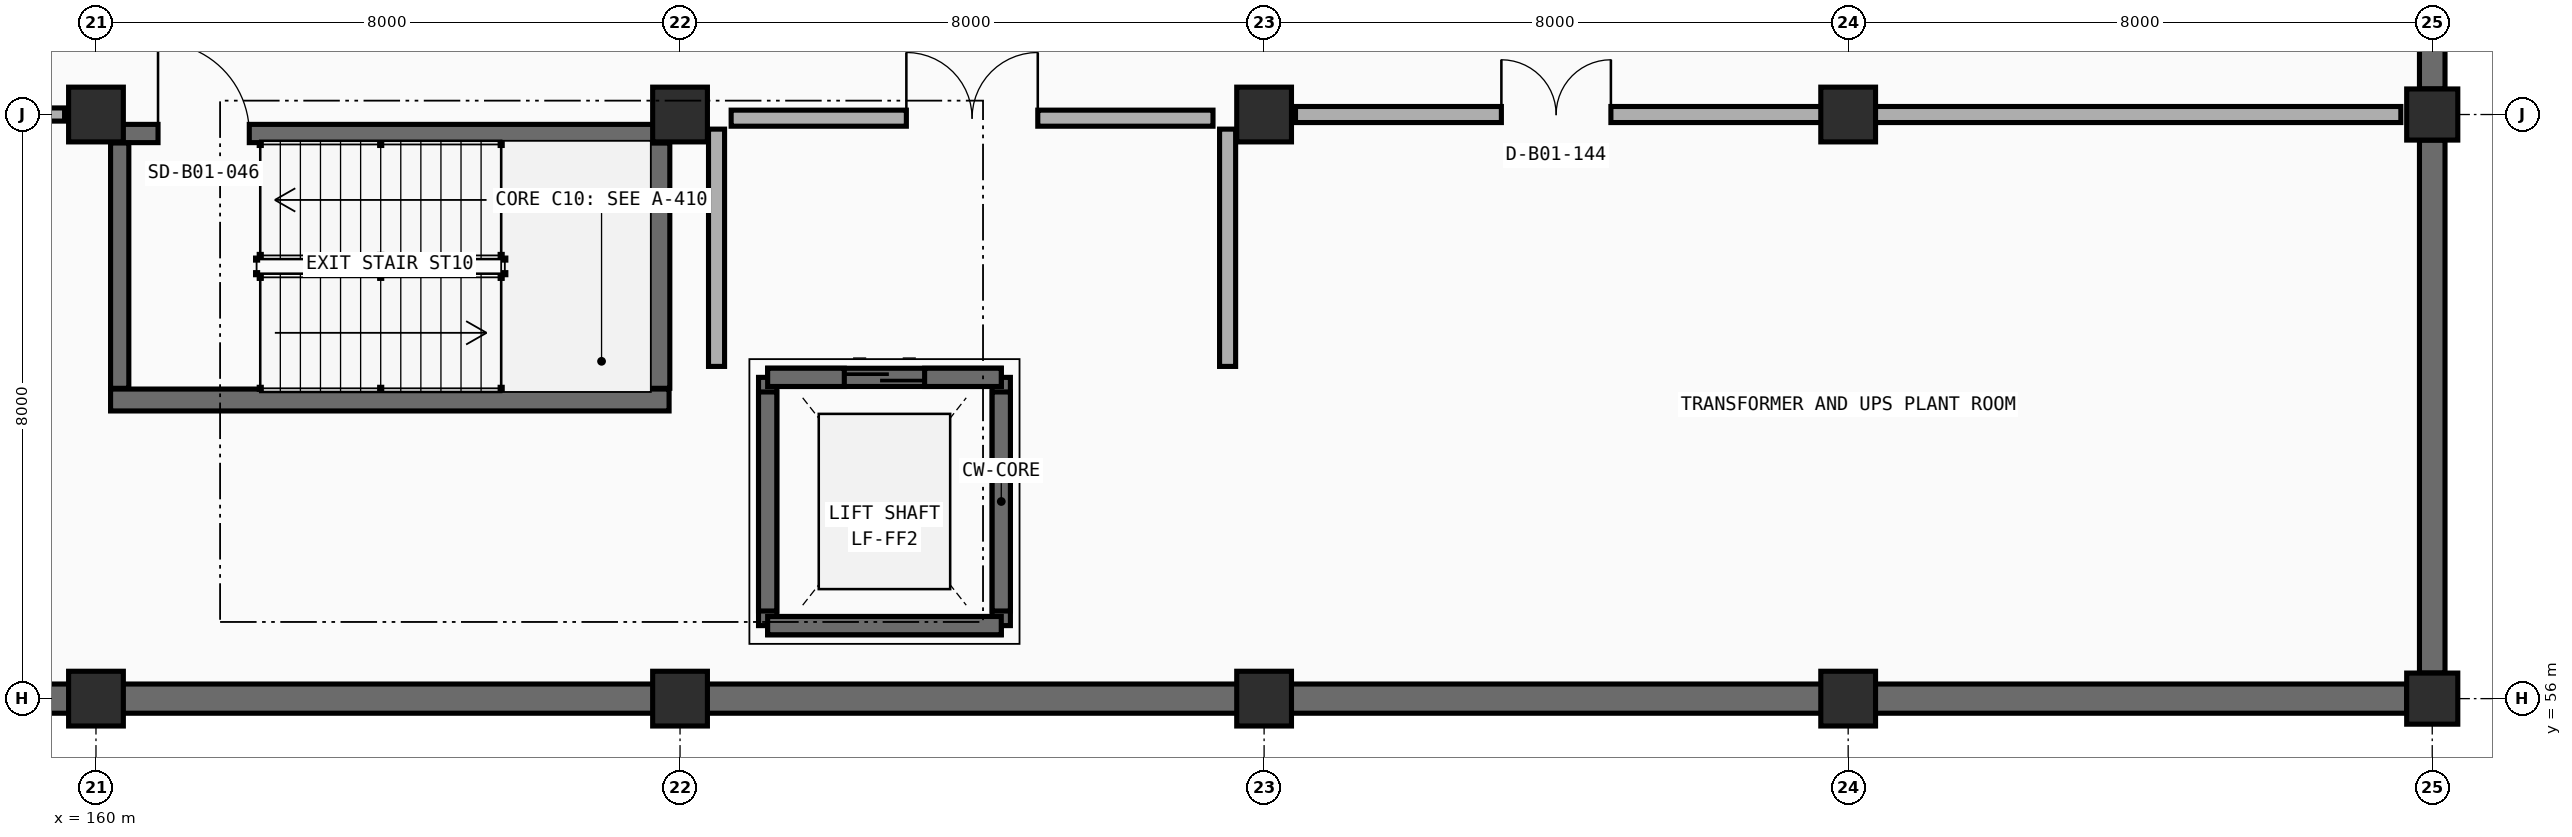
"""IFC4 building model, lengths in metres.
Left out: names, types, materials, properties, quantities, classifications, styles, units other than length and angle.
Written with IfcOpenShell. Run it as: python <this file> out.ifc"""

import sys

from ifc_helpers import new_model, si_unit, direction, frame, frame_2d, origin, origin_2d, place, context, subcontext, project, spatial, rectangle, extrude, element, fill, save


model = new_model("IFC4")
c1 = context("Model", 3, precision=1e-05, world=origin(), true_north=direction((0.0, 1.0)))
c2 = subcontext(c1, "Body", "Model", "MODEL_VIEW")
j1 = project(units=[si_unit("LENGTHUNIT", "METRE"), si_unit("PLANEANGLEUNIT", "RADIAN")], contexts=[c1])
p1 = place(None, origin())
s1 = spatial("IfcSite", under=j1, at=p1, CompositionType="ELEMENT")
p2 = place(p1, origin())
s2 = spatial("IfcBuilding", under=s1, at=p2, CompositionType="ELEMENT")
p3 = place(p2, frame((0.0, 0.0, -4.5)))
s3 = spatial("IfcBuildingStorey", under=s2, at=p3, CompositionType="ELEMENT", Elevation=-4.5)
for number, where, z_axis, x_axis in (
    (1, (160.0, 56.0, -0.405), (0.0, 0.0, 1.0), (1.0, 0.0, 0.0)),
    (2, (168.0, 56.0, -0.405), (0.0, 0.0, 1.0), (1.0, 0.0, 0.0)),
    (3, (176.0, 56.0, -0.405), (0.0, 0.0, 1.0), (1.0, 0.0, 0.0)),
    (4, (184.0, 56.0, -0.405), (0.0, 0.0, 1.0), (1.0, 0.0, 0.0)),
):
    element("IfcColumn", number, at=place(p3, frame(where, z_axis=z_axis, x_axis=x_axis)), inside=s3, PredefinedType="COLUMN", context=c2, shape_type="SweptSolid", body=[
        extrude(rectangle(XDim=0.75, YDim=0.75, at=origin_2d()), origin(), (0.0, 0.0, 1.0), 4.905),
    ])
p4 = place(p3, frame((192.0, 56.0, -0.405), z_axis=(0.0, 0.0, 1.0), x_axis=(1.0, 0.0, 0.0)))
e5 = element("IfcColumn", 5, at=p4, inside=s3, PredefinedType="COLUMN", context=c2, shape_type="SweptSolid", body=[
    extrude(rectangle(XDim=0.7, YDim=0.7, at=origin_2d()), origin(), (0.0, 0.0, 1.0), 4.905),
])
for number, where, z_axis, x_axis in (
    (6, (160.0, 64.0, -0.405), (0.0, 0.0, 1.0), (1.0, 0.0, 0.0)),
    (7, (168.0, 64.0, -0.405), (0.0, 0.0, 1.0), (1.0, 0.0, 0.0)),
    (8, (176.0, 64.0, -0.405), (0.0, 0.0, 1.0), (1.0, 0.0, 0.0)),
    (9, (184.0, 64.0, -0.405), (0.0, 0.0, 1.0), (1.0, 0.0, 0.0)),
):
    element("IfcColumn", number, at=place(p3, frame(where, z_axis=z_axis, x_axis=x_axis)), inside=s3, PredefinedType="COLUMN", context=c2, shape_type="SweptSolid", body=[
        extrude(rectangle(XDim=0.75, YDim=0.75, at=origin_2d()), origin(), (0.0, 0.0, 1.0), 4.905),
    ])
p5 = place(p3, frame((192.0, 64.0, -0.405), z_axis=(0.0, 0.0, 1.0), x_axis=(1.0, 0.0, 0.0)))
e10 = element("IfcColumn", 10, at=p5, inside=s3, PredefinedType="COLUMN", context=c2, shape_type="SweptSolid", body=[
    extrude(rectangle(XDim=0.7, YDim=0.7, at=origin_2d()), origin(), (0.0, 0.0, 1.0), 4.905),
])
for number, where, z_axis, x_axis in (
    (11, (159.65, 56.0, 0.0), (0.0, 0.0, 1.0), (-1.0, 0.0, 0.0)),
    (12, (167.65, 56.0, 0.0), (0.0, 0.0, 1.0), (-1.0, 0.0, 0.0)),
    (13, (175.65, 56.0, 0.0), (0.0, 0.0, 1.0), (-1.0, 0.0, 0.0)),
    (14, (183.65, 56.0, 0.0), (0.0, 0.0, 1.0), (-1.0, 0.0, 0.0)),
    (15, (191.65, 56.0, 0.0), (0.0, 0.0, 1.0), (-1.0, 0.0, 0.0)),
):
    element("IfcWall", number, at=place(p3, frame(where, z_axis=z_axis, x_axis=x_axis)), inside=s3, PredefinedType="USERDEFINED", context=c2, shape_type="SweptSolid", body=[
        extrude(rectangle(XDim=7.3, YDim=0.4, at=frame_2d((3.65, 0.0))), origin(), (0.0, 0.0, 1.0), 4.095),
    ])
for number, where, z_axis, x_axis in (
    (16, (192.0, 63.65, 0.0), (0.0, 0.0, 1.0), (0.0, -1.0, 0.0)),
    (17, (192.0, 71.65, 0.0), (0.0, 0.0, 1.0), (0.0, -1.0, 0.0)),
):
    element("IfcWall", number, at=place(p3, frame(where, z_axis=z_axis, x_axis=x_axis)), inside=s3, PredefinedType="USERDEFINED", context=c2, shape_type="SweptSolid", body=[
        extrude(rectangle(XDim=7.3, YDim=0.35, at=frame_2d((3.65, 0.0))), origin(), (0.0, 0.0, 1.0), 4.095),
    ])
p6 = place(p3, frame((160.2, 60.09, 0.0), z_axis=(0.0, 0.0, 1.0), x_axis=(1.0, 0.0, 0.0)))
e18 = element("IfcWall", 18, at=p6, inside=s3, PredefinedType="SHEAR", context=c2, shape_type="SweptSolid", body=[
    extrude(rectangle(XDim=7.65, YDim=0.3, at=frame_2d((3.825, 0.0))), origin(), (0.0, 0.0, 1.0), 4.5),
])
p7 = place(p3, frame((167.71, 60.25, 0.0), z_axis=(0.0, 0.0, 1.0), x_axis=(0.0, 1.0, 0.0)))
e19 = element("IfcWall", 19, at=p7, inside=s3, PredefinedType="SHEAR", context=c2, shape_type="SweptSolid", body=[
    extrude(rectangle(XDim=3.36, YDim=0.3, at=frame_2d((1.68, 0.0))), origin(), (0.0, 0.0, 1.0), 4.5),
])
p8 = place(p3, frame((160.2, 63.74, 0.0), z_axis=(0.0, 0.0, 1.0), x_axis=(1.0, 0.0, 0.0)))
e20 = element("IfcWall", 20, at=p8, inside=s3, PredefinedType="SOLIDWALL", context=c2, shape_type="SweptSolid", body=[
    extrude(rectangle(XDim=7.65, YDim=0.25, at=frame_2d((3.825, 0.0))), origin(), (0.0, 0.0, 1.0), 4.5),
])
p9 = place(p8, frame((0.65, 0.0, 0.0)))
e21 = element("IfcOpeningElement", 21, at=p9, cuts=e20, PredefinedType="OPENING", context=c2, shape_type="SweptSolid", body=[
    extrude(rectangle(XDim=1.25, YDim=2.15, at=frame_2d((0.625, 1.075))), frame((0.0, 0.135, 0.0), z_axis=(0.0, -1.0, 0.0), x_axis=(1.0, 0.0, 0.0)), (0.0, 0.0, 1.0), 0.27),
])
p10 = place(p3, frame((160.325, 60.25, 0.0), z_axis=(0.0, 0.0, 1.0), x_axis=(0.0, 1.0, 0.0)))
e22 = element("IfcWall", 22, at=p10, inside=s3, PredefinedType="SOLIDWALL", context=c2, shape_type="SweptSolid", body=[
    extrude(rectangle(XDim=3.36, YDim=0.25, at=frame_2d((1.68, 0.0))), origin(), (0.0, 0.0, 1.0), 4.5),
])
p11 = place(p3, frame((169.2, 57.0, -1.5), z_axis=(0.0, 0.0, 1.0), x_axis=(1.0, 0.0, 0.0)))
e23 = element("IfcWall", 23, at=p11, inside=s3, PredefinedType="SOLIDWALL", context=c2, shape_type="SweptSolid", body=[
    extrude(rectangle(XDim=3.2, YDim=0.25, at=frame_2d((1.6, 0.0))), origin(), (0.0, 0.0, 1.0), 1.5),
])
p12 = place(p3, frame((172.4, 57.0, -1.5), z_axis=(0.0, 0.0, 1.0), x_axis=(0.0, 1.0, 0.0)))
e24 = element("IfcWall", 24, at=p12, inside=s3, PredefinedType="SOLIDWALL", context=c2, shape_type="SweptSolid", body=[
    extrude(rectangle(XDim=3.4, YDim=0.25, at=frame_2d((1.7, 0.0))), origin(), (0.0, 0.0, 1.0), 1.5),
])
p13 = place(p3, frame((172.4, 60.4, -1.5), z_axis=(0.0, 0.0, 1.0), x_axis=(-1.0, 0.0, 0.0)))
e25 = element("IfcWall", 25, at=p13, inside=s3, PredefinedType="SOLIDWALL", context=c2, shape_type="SweptSolid", body=[
    extrude(rectangle(XDim=3.2, YDim=0.25, at=frame_2d((1.6, 0.0))), origin(), (0.0, 0.0, 1.0), 1.5),
])
p14 = place(p3, frame((169.2, 60.4, -1.5), z_axis=(0.0, 0.0, 1.0), x_axis=(0.0, -1.0, 0.0)))
e26 = element("IfcWall", 26, at=p14, inside=s3, PredefinedType="SOLIDWALL", context=c2, shape_type="SweptSolid", body=[
    extrude(rectangle(XDim=3.4, YDim=0.25, at=frame_2d((1.7, 0.0))), origin(), (0.0, 0.0, 1.0), 1.5),
])
p15 = place(p3, frame((169.2, 57.0, 0.0), z_axis=(0.0, 0.0, 1.0), x_axis=(1.0, 0.0, 0.0)))
e27 = element("IfcWall", 27, at=p15, inside=s3, PredefinedType="SOLIDWALL", context=c2, shape_type="SweptSolid", body=[
    extrude(rectangle(XDim=3.2, YDim=0.25, at=frame_2d((1.6, 0.0))), origin(), (0.0, 0.0, 1.0), 4.5),
])
p16 = place(p3, frame((169.2, 60.4, 0.0), z_axis=(0.0, 0.0, 1.0), x_axis=(1.0, 0.0, 0.0)))
e28 = element("IfcWall", 28, at=p16, inside=s3, PredefinedType="SOLIDWALL", context=c2, shape_type="SweptSolid", body=[
    extrude(rectangle(XDim=3.2, YDim=0.25, at=frame_2d((1.6, 0.0))), origin(), (0.0, 0.0, 1.0), 4.5),
])
p17 = place(p16, frame((1.05, 0.0, 0.0)))
e29 = element("IfcOpeningElement", 29, at=p17, cuts=e28, PredefinedType="OPENING", context=c2, shape_type="SweptSolid", body=[
    extrude(rectangle(XDim=1.1, YDim=2.15, at=frame_2d((0.55, 1.075))), frame((0.0, 0.135, 0.0), z_axis=(0.0, -1.0, 0.0), x_axis=(1.0, 0.0, 0.0)), (0.0, 0.0, 1.0), 0.27),
])
for number, where, z_axis, x_axis in (
    (30, (169.2, 57.2, 0.0), (0.0, 0.0, 1.0), (0.0, 1.0, 0.0)),
    (31, (172.4, 57.2, 0.0), (0.0, 0.0, 1.0), (0.0, 1.0, 0.0)),
):
    element("IfcWall", number, at=place(p3, frame(where, z_axis=z_axis, x_axis=x_axis)), inside=s3, PredefinedType="SOLIDWALL", context=c2, shape_type="SweptSolid", body=[
        extrude(rectangle(XDim=3.0, YDim=0.25, at=frame_2d((1.5, 0.0))), origin(), (0.0, 0.0, 1.0), 4.5),
    ])
p18 = place(p3, frame((168.7, 63.95, 0.0), z_axis=(0.0, 0.0, 1.0), x_axis=(1.0, 0.0, 0.0)))
e32 = element("IfcWall", 32, at=p18, inside=s3, PredefinedType="PARTITIONING", context=c2, shape_type="SweptSolid", body=[
    extrude(rectangle(XDim=6.6, YDim=0.22, at=frame_2d((3.3, 0.0))), origin(), (0.0, 0.0, 1.0), 3.37),
])
p19 = place(p18, frame((2.4, 0.0, 0.0)))
e33 = element("IfcOpeningElement", 33, at=p19, cuts=e32, PredefinedType="OPENING", context=c2, shape_type="SweptSolid", body=[
    extrude(rectangle(XDim=1.8, YDim=2.2, at=frame_2d((0.9, 1.1))), frame((0.0, 0.12, 0.0), z_axis=(0.0, -1.0, 0.0), x_axis=(1.0, 0.0, 0.0)), (0.0, 0.0, 1.0), 0.24),
])
for number, where, z_axis, x_axis in (
    (34, (168.5, 60.55, 0.0), (0.0, 0.0, 1.0), (0.0, 1.0, 0.0)),
    (35, (175.5, 60.55, 0.0), (0.0, 0.0, 1.0), (0.0, 1.0, 0.0)),
):
    element("IfcWall", number, at=place(p3, frame(where, z_axis=z_axis, x_axis=x_axis)), inside=s3, PredefinedType="PARTITIONING", context=c2, shape_type="SweptSolid", body=[
        extrude(rectangle(XDim=3.25, YDim=0.22, at=frame_2d((1.625, 0.0))), origin(), (0.0, 0.0, 1.0), 3.27),
    ])
p20 = place(p3, frame((136.43, 64.0, 0.0), z_axis=(0.0, 0.0, 1.0), x_axis=(1.0, 0.0, 0.0)))
e36 = element("IfcWall", 36, at=p20, inside=s3, PredefinedType="PARTITIONING", context=c2, shape_type="SweptSolid", body=[
    extrude(rectangle(XDim=23.14, YDim=0.18, at=frame_2d((11.57, 0.0))), origin(), (0.0, 0.0, 1.0), 3.37),
])
p21 = place(p20, frame((3.09, 0.0, 0.0)))
e37 = element("IfcOpeningElement", 37, at=p21, cuts=e36, PredefinedType="OPENING", context=c2, shape_type="SweptSolid", body=[
    extrude(rectangle(XDim=0.96, YDim=2.15, at=frame_2d((0.48, 1.075))), frame((0.0, 0.1, 0.0), z_axis=(0.0, -1.0, 0.0), x_axis=(1.0, 0.0, 0.0)), (0.0, 0.0, 1.0), 0.2),
])
p22 = place(p3, frame((176.43, 64.0, 0.0), z_axis=(0.0, 0.0, 1.0), x_axis=(1.0, 0.0, 0.0)))
e38 = element("IfcWall", 38, at=p22, inside=s3, PredefinedType="PARTITIONING", context=c2, shape_type="SweptSolid", body=[
    extrude(rectangle(XDim=15.14, YDim=0.22, at=frame_2d((7.57, 0.0))), origin(), (0.0, 0.0, 1.0), 3.37),
])
p23 = place(p22, frame((2.82, 0.0, 0.0)))
e39 = element("IfcOpeningElement", 39, at=p23, cuts=e38, PredefinedType="OPENING", context=c2, shape_type="SweptSolid", body=[
    extrude(rectangle(XDim=1.5, YDim=2.2, at=frame_2d((0.75, 1.1))), frame((0.0, 0.12, 0.0), z_axis=(0.0, -1.0, 0.0), x_axis=(1.0, 0.0, 0.0)), (0.0, 0.0, 1.0), 0.24),
])
p24 = place(p9, origin())
e40 = element("IfcDoor", 40, at=p24, inside=s3, OperationType="SINGLE_SWING_LEFT", PredefinedType="DOOR", context=c2, shape_type="SweptSolid", body=[
    extrude(rectangle(XDim=1.25, YDim=2.15, at=frame_2d((0.625, 1.075))), frame((0.0, 0.025, 0.0), z_axis=(0.0, -1.0, 0.0), x_axis=(1.0, 0.0, 0.0)), (0.0, 0.0, 1.0), 0.05),
])
fill(e21, e40)
p25 = place(p17, origin())
e41 = element("IfcDoor", 41, at=p25, inside=s3, OperationType="DOUBLE_DOOR_SLIDING", PredefinedType="DOOR", context=c2, shape_type="SweptSolid", body=[
    extrude(rectangle(XDim=1.1, YDim=2.15, at=frame_2d((0.55, 1.075))), frame((0.0, 0.025, 0.0), z_axis=(0.0, -1.0, 0.0), x_axis=(1.0, 0.0, 0.0)), (0.0, 0.0, 1.0), 0.05),
])
fill(e29, e41)
p26 = place(p19, origin())
e42 = element("IfcDoor", 42, at=p26, inside=s3, OperationType="DOUBLE_DOOR_SINGLE_SWING", PredefinedType="DOOR", context=c2, shape_type="SweptSolid", body=[
    extrude(rectangle(XDim=1.8, YDim=2.2, at=frame_2d((0.9, 1.1))), frame((0.0, 0.025, 0.0), z_axis=(0.0, -1.0, 0.0), x_axis=(1.0, 0.0, 0.0)), (0.0, 0.0, 1.0), 0.05),
])
fill(e33, e42)
p27 = place(p23, origin())
e43 = element("IfcDoor", 43, at=p27, inside=s3, OperationType="DOUBLE_DOOR_SINGLE_SWING", PredefinedType="DOOR", context=c2, shape_type="SweptSolid", body=[
    extrude(rectangle(XDim=1.5, YDim=2.2, at=frame_2d((0.75, 1.1))), frame((0.0, 0.025, 0.0), z_axis=(0.0, -1.0, 0.0), x_axis=(1.0, 0.0, 0.0)), (0.0, 0.0, 1.0), 0.05),
])
fill(e39, e43)
save(model, sys.argv[1])
